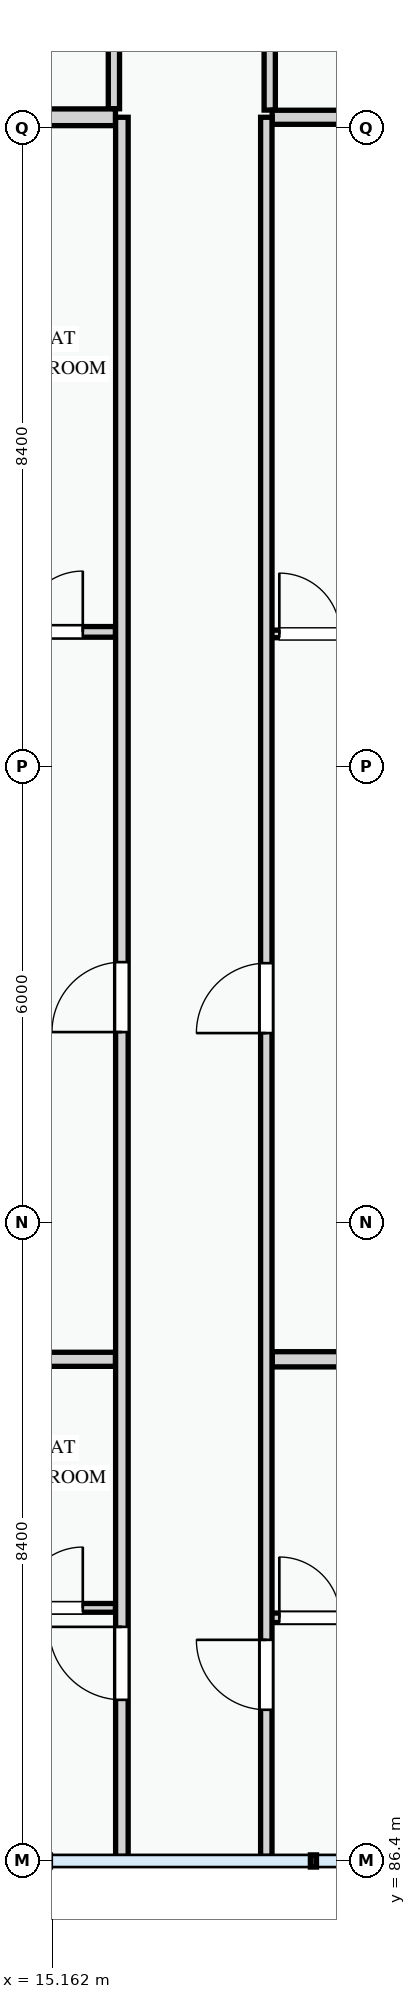
"""IFC4 building model, lengths in metres.
Left out: names, types, materials, properties, quantities, classifications, styles, units other than length and angle.
Written with IfcOpenShell. Run it as: python <this file> out.ifc"""

import sys

from ifc_helpers import new_model, si_unit, direction, frame, frame_2d, origin, place, context, subcontext, project, spatial, rectangle, extrude, element, fill, save


model = new_model("IFC4")
c1 = context("Model", 3, precision=1e-05, world=origin(), true_north=direction((0.0, 1.0)))
c2 = subcontext(c1, "Body", "Model", "MODEL_VIEW")
j1 = project(units=[si_unit("LENGTHUNIT", "METRE"), si_unit("PLANEANGLEUNIT", "RADIAN")], contexts=[c1])
p1 = place(None, origin())
s1 = spatial("IfcSite", under=j1, at=p1, CompositionType="ELEMENT")
p2 = place(p1, origin())
s2 = spatial("IfcBuilding", under=s1, at=p2, CompositionType="ELEMENT")
p3 = place(p2, frame((0.0, 0.0, 44.4)))
s3 = spatial("IfcBuildingStorey", under=s2, at=p3, CompositionType="ELEMENT", Elevation=44.4)
p4 = place(p3, frame((15.975, 113.324, 0.0), z_axis=(0.0, 0.0, 1.0), x_axis=(0.0, -1.0, 0.0)))
e1 = element("IfcWall", 1, at=p4, inside=s3, PredefinedType="PARTITIONING", context=c2, shape_type="SweptSolid", body=[
    extrude(rectangle(XDim=3.872, YDim=0.148, at=frame_2d((1.936, 0.0))), origin(), (0.0, 0.0, 1.0), 3.0),
])
p5 = place(p3, frame((18.025, 113.324, 0.0), z_axis=(0.0, 0.0, 1.0), x_axis=(0.0, -1.0, 0.0)))
e2 = element("IfcWall", 2, at=p5, inside=s3, PredefinedType="PARTITIONING", context=c2, shape_type="SweptSolid", body=[
    extrude(rectangle(XDim=3.889, YDim=0.148, at=frame_2d((1.945, 0.0))), origin(), (0.0, 0.0, 1.0), 3.0),
])
p6 = place(p3, frame((8.52, 89.73, 0.0), z_axis=(0.0, 0.0, 1.0), x_axis=(1.0, 0.0, 0.0)))
e3 = element("IfcWall", 3, at=p6, inside=s3, PredefinedType="PARTITIONING", context=c2, shape_type="SweptSolid", body=[
    extrude(rectangle(XDim=7.476, YDim=0.115, at=frame_2d((3.738, 0.0))), origin(), (0.0, 0.0, 1.0), 3.0),
])
p7 = place(p6, frame((1.344, 0.0, 0.0)))
e4 = element("IfcOpeningElement", 4, at=p7, cuts=e3, PredefinedType="OPENING", context=c2, shape_type="SweptSolid", body=[
    extrude(rectangle(XDim=0.85, YDim=2.1, at=frame_2d((0.425, 1.05))), frame((0.0, 0.067, 0.0), z_axis=(0.0, -1.0, 0.0), x_axis=(1.0, 0.0, 0.0)), (0.0, 0.0, 1.0), 0.135),
])
p8 = place(p6, frame((4.24, 0.0, 0.0)))
e5 = element("IfcOpeningElement", 5, at=p8, cuts=e3, PredefinedType="OPENING", context=c2, shape_type="SweptSolid", body=[
    extrude(rectangle(XDim=0.85, YDim=2.1, at=frame_2d((0.425, 1.05))), frame((0.0, 0.067, 0.0), z_axis=(0.0, -1.0, 0.0), x_axis=(1.0, 0.0, 0.0)), (0.0, 0.0, 1.0), 0.135),
])
p9 = place(p6, frame((6.246, 0.0, 0.0)))
e6 = element("IfcOpeningElement", 6, at=p9, cuts=e3, PredefinedType="OPENING", context=c2, shape_type="SweptSolid", body=[
    extrude(rectangle(XDim=0.8, YDim=2.1, at=frame_2d((0.4, 1.05))), frame((0.0, 0.067, 0.0), z_axis=(0.0, -1.0, 0.0), x_axis=(1.0, 0.0, 0.0)), (0.0, 0.0, 1.0), 0.135),
])
p10 = place(p3, frame((17.98, 89.599, 0.0), z_axis=(0.0, 0.0, 1.0), x_axis=(1.0, 0.0, 0.0)))
e7 = element("IfcWall", 7, at=p10, inside=s3, PredefinedType="PARTITIONING", context=c2, shape_type="SweptSolid", body=[
    extrude(rectangle(XDim=4.7, YDim=0.125, at=frame_2d((2.35, 0.0))), origin(), (0.0, 0.0, 1.0), 3.0),
])
p11 = place(p10, frame((0.171, 0.0, 0.0)))
e8 = element("IfcOpeningElement", 8, at=p11, cuts=e7, PredefinedType="OPENING", context=c2, shape_type="SweptSolid", body=[
    extrude(rectangle(XDim=0.8, YDim=2.1, at=frame_2d((0.4, 1.05))), frame((0.0, 0.073, 0.0), z_axis=(0.0, -1.0, 0.0), x_axis=(1.0, 0.0, 0.0)), (0.0, 0.0, 1.0), 0.145),
])
p12 = place(p10, frame((1.384, 0.0, 0.0)))
e9 = element("IfcOpeningElement", 9, at=p12, cuts=e7, PredefinedType="OPENING", context=c2, shape_type="SweptSolid", body=[
    extrude(rectangle(XDim=0.85, YDim=2.1, at=frame_2d((0.425, 1.05))), frame((0.0, 0.073, 0.0), z_axis=(0.0, -1.0, 0.0), x_axis=(1.0, 0.0, 0.0)), (0.0, 0.0, 1.0), 0.145),
])
p13 = place(p10, frame((3.193, 0.0, 0.0)))
e10 = element("IfcOpeningElement", 10, at=p13, cuts=e7, PredefinedType="OPENING", context=c2, shape_type="SweptSolid", body=[
    extrude(rectangle(XDim=0.85, YDim=2.1, at=frame_2d((0.425, 1.05))), frame((0.0, 0.073, 0.0), z_axis=(0.0, -1.0, 0.0), x_axis=(1.0, 0.0, 0.0)), (0.0, 0.0, 1.0), 0.145),
])
p14 = place(p3, frame((8.52, 102.57, 0.0), z_axis=(0.0, 0.0, 1.0), x_axis=(1.0, 0.0, 0.0)))
e11 = element("IfcWall", 11, at=p14, inside=s3, PredefinedType="PARTITIONING", context=c2, shape_type="SweptSolid", body=[
    extrude(rectangle(XDim=7.476, YDim=0.14, at=frame_2d((3.738, 0.0))), origin(), (0.0, 0.0, 1.0), 3.0),
])
p15 = place(p14, frame((1.344, 0.0, 0.0)))
e12 = element("IfcOpeningElement", 12, at=p15, cuts=e11, PredefinedType="OPENING", context=c2, shape_type="SweptSolid", body=[
    extrude(rectangle(XDim=0.85, YDim=2.1, at=frame_2d((0.425, 1.05))), frame((0.0, 0.08, 0.0), z_axis=(0.0, -1.0, 0.0), x_axis=(1.0, 0.0, 0.0)), (0.0, 0.0, 1.0), 0.16),
])
p16 = place(p14, frame((4.24, 0.0, 0.0)))
e13 = element("IfcOpeningElement", 13, at=p16, cuts=e11, PredefinedType="OPENING", context=c2, shape_type="SweptSolid", body=[
    extrude(rectangle(XDim=0.82, YDim=2.08, at=frame_2d((0.41, 1.04))), frame((0.0, 0.08, 0.0), z_axis=(0.0, -1.0, 0.0), x_axis=(1.0, 0.0, 0.0)), (0.0, 0.0, 1.0), 0.16),
])
p17 = place(p14, frame((6.246, 0.0, 0.0)))
e14 = element("IfcOpeningElement", 14, at=p17, cuts=e11, PredefinedType="OPENING", context=c2, shape_type="SweptSolid", body=[
    extrude(rectangle(XDim=0.8, YDim=2.1, at=frame_2d((0.4, 1.05))), frame((0.0, 0.08, 0.0), z_axis=(0.0, -1.0, 0.0), x_axis=(1.0, 0.0, 0.0)), (0.0, 0.0, 1.0), 0.16),
])
p18 = place(p3, frame((17.98, 102.543, 0.0), z_axis=(0.0, 0.0, 1.0), x_axis=(1.0, 0.0, 0.0)))
e15 = element("IfcWall", 15, at=p18, inside=s3, PredefinedType="PARTITIONING", context=c2, shape_type="SweptSolid", body=[
    extrude(rectangle(XDim=4.7, YDim=0.1, at=frame_2d((2.35, 0.0))), origin(), (0.0, 0.0, 1.0), 3.0),
])
p19 = place(p18, frame((0.171, 0.0, 0.0)))
e16 = element("IfcOpeningElement", 16, at=p19, cuts=e15, PredefinedType="OPENING", context=c2, shape_type="SweptSolid", body=[
    extrude(rectangle(XDim=0.8, YDim=2.1, at=frame_2d((0.4, 1.05))), frame((0.0, 0.06, 0.0), z_axis=(0.0, -1.0, 0.0), x_axis=(1.0, 0.0, 0.0)), (0.0, 0.0, 1.0), 0.12),
])
p20 = place(p18, frame((1.384, 0.0, 0.0)))
e17 = element("IfcOpeningElement", 17, at=p20, cuts=e15, PredefinedType="OPENING", context=c2, shape_type="SweptSolid", body=[
    extrude(rectangle(XDim=0.85, YDim=2.1, at=frame_2d((0.425, 1.05))), frame((0.0, 0.06, 0.0), z_axis=(0.0, -1.0, 0.0), x_axis=(1.0, 0.0, 0.0)), (0.0, 0.0, 1.0), 0.12),
])
p21 = place(p18, frame((3.193, 0.0, 0.0)))
e18 = element("IfcOpeningElement", 18, at=p21, cuts=e15, PredefinedType="OPENING", context=c2, shape_type="SweptSolid", body=[
    extrude(rectangle(XDim=0.82, YDim=2.08, at=frame_2d((0.41, 1.04))), frame((0.0, 0.06, 0.0), z_axis=(0.0, -1.0, 0.0), x_axis=(1.0, 0.0, 0.0)), (0.0, 0.0, 1.0), 0.12),
])
p22 = place(p3, frame((8.52, 93.0, 0.0), z_axis=(0.0, 0.0, 1.0), x_axis=(1.0, 0.0, 0.0)))
e19 = element("IfcWall", 19, at=p22, inside=s3, PredefinedType="PARTITIONING", context=c2, shape_type="SweptSolid", body=[
    extrude(rectangle(XDim=7.476, YDim=0.185, at=frame_2d((3.738, 0.0))), origin(), (0.0, 0.0, 1.0), 3.0),
])
p23 = place(p3, frame((18.057, 93.0, 0.0), z_axis=(0.0, 0.0, 1.0), x_axis=(1.0, 0.0, 0.0)))
e20 = element("IfcWall", 20, at=p23, inside=s3, PredefinedType="PARTITIONING", context=c2, shape_type="SweptSolid", body=[
    extrude(rectangle(XDim=4.624, YDim=0.2, at=frame_2d((2.312, 0.0))), origin(), (0.0, 0.0, 1.0), 3.0),
])
p24 = place(p3, frame((8.52, 109.34, 0.0), z_axis=(0.0, 0.0, 1.0), x_axis=(1.0, 0.0, 0.0)))
e21 = element("IfcWall", 21, at=p24, inside=s3, PredefinedType="PARTITIONING", context=c2, shape_type="SweptSolid", body=[
    extrude(rectangle(XDim=7.476, YDim=0.22, at=frame_2d((3.738, 0.0))), origin(), (0.0, 0.0, 1.0), 2.375),
])
p25 = place(p3, frame((18.057, 109.34, 0.0), z_axis=(0.0, 0.0, 1.0), x_axis=(1.0, 0.0, 0.0)))
e22 = element("IfcWall", 22, at=p25, inside=s3, PredefinedType="PARTITIONING", context=c2, shape_type="SweptSolid", body=[
    extrude(rectangle(XDim=4.683, YDim=0.185, at=frame_2d((2.342, 0.0))), origin(), (0.0, 0.0, 1.0), 2.375),
])
p26 = place(p3, frame((16.08, 86.46, 0.0), z_axis=(0.0, 0.0, 1.0), x_axis=(0.0, 1.0, 0.0)))
e23 = element("IfcWall", 23, at=p26, inside=s3, PredefinedType="PARTITIONING", context=c2, shape_type="SweptSolid", body=[
    extrude(rectangle(XDim=22.88, YDim=0.165, at=frame_2d((11.44, 0.0))), origin(), (0.0, 0.0, 1.0), 3.0),
])
p27 = place(p26, frame((2.06, 0.0, 0.0)))
e24 = element("IfcOpeningElement", 24, at=p27, cuts=e23, PredefinedType="OPENING", context=c2, shape_type="SweptSolid", body=[
    extrude(rectangle(XDim=0.96, YDim=2.12, at=frame_2d((0.48, 1.06))), frame((0.0, 0.093, 0.0), z_axis=(0.0, -1.0, 0.0), x_axis=(1.0, 0.0, 0.0)), (0.0, 0.0, 1.0), 0.185),
])
p28 = place(p26, frame((10.845, 0.0, 0.0)))
e25 = element("IfcOpeningElement", 25, at=p28, cuts=e23, PredefinedType="OPENING", context=c2, shape_type="SweptSolid", body=[
    extrude(rectangle(XDim=0.92, YDim=2.1, at=frame_2d((0.46, 1.05))), frame((0.0, 0.093, 0.0), z_axis=(0.0, -1.0, 0.0), x_axis=(1.0, 0.0, 0.0)), (0.0, 0.0, 1.0), 0.185),
])
p29 = place(p3, frame((17.98, 86.46, 0.0), z_axis=(0.0, 0.0, 1.0), x_axis=(0.0, 1.0, 0.0)))
e26 = element("IfcWall", 26, at=p29, inside=s3, PredefinedType="PARTITIONING", context=c2, shape_type="SweptSolid", body=[
    extrude(rectangle(XDim=22.88, YDim=0.15, at=frame_2d((11.44, 0.0))), origin(), (0.0, 0.0, 1.0), 3.0),
])
p30 = place(p29, frame((1.929, 0.0, 0.0)))
e27 = element("IfcOpeningElement", 27, at=p30, cuts=e26, PredefinedType="OPENING", context=c2, shape_type="SweptSolid", body=[
    extrude(rectangle(XDim=0.92, YDim=2.1, at=frame_2d((0.46, 1.05))), frame((0.0, 0.085, 0.0), z_axis=(0.0, -1.0, 0.0), x_axis=(1.0, 0.0, 0.0)), (0.0, 0.0, 1.0), 0.17),
])
p31 = place(p29, frame((10.832, 0.0, 0.0)))
e28 = element("IfcOpeningElement", 28, at=p31, cuts=e26, PredefinedType="OPENING", context=c2, shape_type="SweptSolid", body=[
    extrude(rectangle(XDim=0.92, YDim=2.1, at=frame_2d((0.46, 1.05))), frame((0.0, 0.085, 0.0), z_axis=(0.0, -1.0, 0.0), x_axis=(1.0, 0.0, 0.0)), (0.0, 0.0, 1.0), 0.17),
])
p32 = place(p9, origin())
e29 = element("IfcDoor", 29, at=p32, inside=s3, OperationType="SINGLE_SWING_RIGHT", PredefinedType="DOOR", context=c2, shape_type="SweptSolid", body=[
    extrude(rectangle(XDim=0.8, YDim=2.1, at=frame_2d((0.4, 1.05))), frame((0.0, 0.025, 0.0), z_axis=(0.0, -1.0, 0.0), x_axis=(1.0, 0.0, 0.0)), (0.0, 0.0, 1.0), 0.05),
])
fill(e6, e29)
p33 = place(p11, origin())
e30 = element("IfcDoor", 30, at=p33, inside=s3, OperationType="SINGLE_SWING_LEFT", PredefinedType="DOOR", context=c2, shape_type="SweptSolid", body=[
    extrude(rectangle(XDim=0.8, YDim=2.1, at=frame_2d((0.4, 1.05))), frame((0.0, 0.025, 0.0), z_axis=(0.0, -1.0, 0.0), x_axis=(1.0, 0.0, 0.0)), (0.0, 0.0, 1.0), 0.05),
])
fill(e8, e30)
p34 = place(p17, origin())
e31 = element("IfcDoor", 31, at=p34, inside=s3, OperationType="SINGLE_SWING_RIGHT", PredefinedType="DOOR", context=c2, shape_type="SweptSolid", body=[
    extrude(rectangle(XDim=0.8, YDim=2.1, at=frame_2d((0.4, 1.05))), frame((0.0, 0.025, 0.0), z_axis=(0.0, -1.0, 0.0), x_axis=(1.0, 0.0, 0.0)), (0.0, 0.0, 1.0), 0.05),
])
fill(e14, e31)
p35 = place(p19, origin())
e32 = element("IfcDoor", 32, at=p35, inside=s3, OperationType="SINGLE_SWING_LEFT", PredefinedType="DOOR", context=c2, shape_type="SweptSolid", body=[
    extrude(rectangle(XDim=0.8, YDim=2.1, at=frame_2d((0.4, 1.05))), frame((0.0, 0.025, 0.0), z_axis=(0.0, -1.0, 0.0), x_axis=(1.0, 0.0, 0.0)), (0.0, 0.0, 1.0), 0.05),
])
fill(e16, e32)
p36 = place(p27, origin())
e33 = element("IfcDoor", 33, at=p36, inside=s3, OperationType="SINGLE_SWING_RIGHT", PredefinedType="DOOR", context=c2, shape_type="SweptSolid", body=[
    extrude(rectangle(XDim=0.96, YDim=2.12, at=frame_2d((0.48, 1.06))), frame((0.0, 0.025, 0.0), z_axis=(0.0, -1.0, 0.0), x_axis=(1.0, 0.0, 0.0)), (0.0, 0.0, 1.0), 0.05),
])
fill(e24, e33)
p37 = place(p28, origin())
e34 = element("IfcDoor", 34, at=p37, inside=s3, OperationType="SINGLE_SWING_LEFT", PredefinedType="DOOR", context=c2, shape_type="SweptSolid", body=[
    extrude(rectangle(XDim=0.92, YDim=2.1, at=frame_2d((0.46, 1.05))), frame((0.0, 0.025, 0.0), z_axis=(0.0, -1.0, 0.0), x_axis=(1.0, 0.0, 0.0)), (0.0, 0.0, 1.0), 0.05),
])
fill(e25, e34)
p38 = place(p30, origin())
e35 = element("IfcDoor", 35, at=p38, inside=s3, OperationType="SINGLE_SWING_RIGHT", PredefinedType="DOOR", context=c2, shape_type="SweptSolid", body=[
    extrude(rectangle(XDim=0.92, YDim=2.1, at=frame_2d((0.46, 1.05))), frame((0.0, 0.025, 0.0), z_axis=(0.0, -1.0, 0.0), x_axis=(1.0, 0.0, 0.0)), (0.0, 0.0, 1.0), 0.05),
])
fill(e27, e35)
p39 = place(p31, origin())
e36 = element("IfcDoor", 36, at=p39, inside=s3, OperationType="SINGLE_SWING_LEFT", PredefinedType="DOOR", context=c2, shape_type="SweptSolid", body=[
    extrude(rectangle(XDim=0.92, YDim=2.1, at=frame_2d((0.46, 1.05))), frame((0.0, 0.025, 0.0), z_axis=(0.0, -1.0, 0.0), x_axis=(1.0, 0.0, 0.0)), (0.0, 0.0, 1.0), 0.05),
])
fill(e28, e36)
save(model, sys.argv[1])
